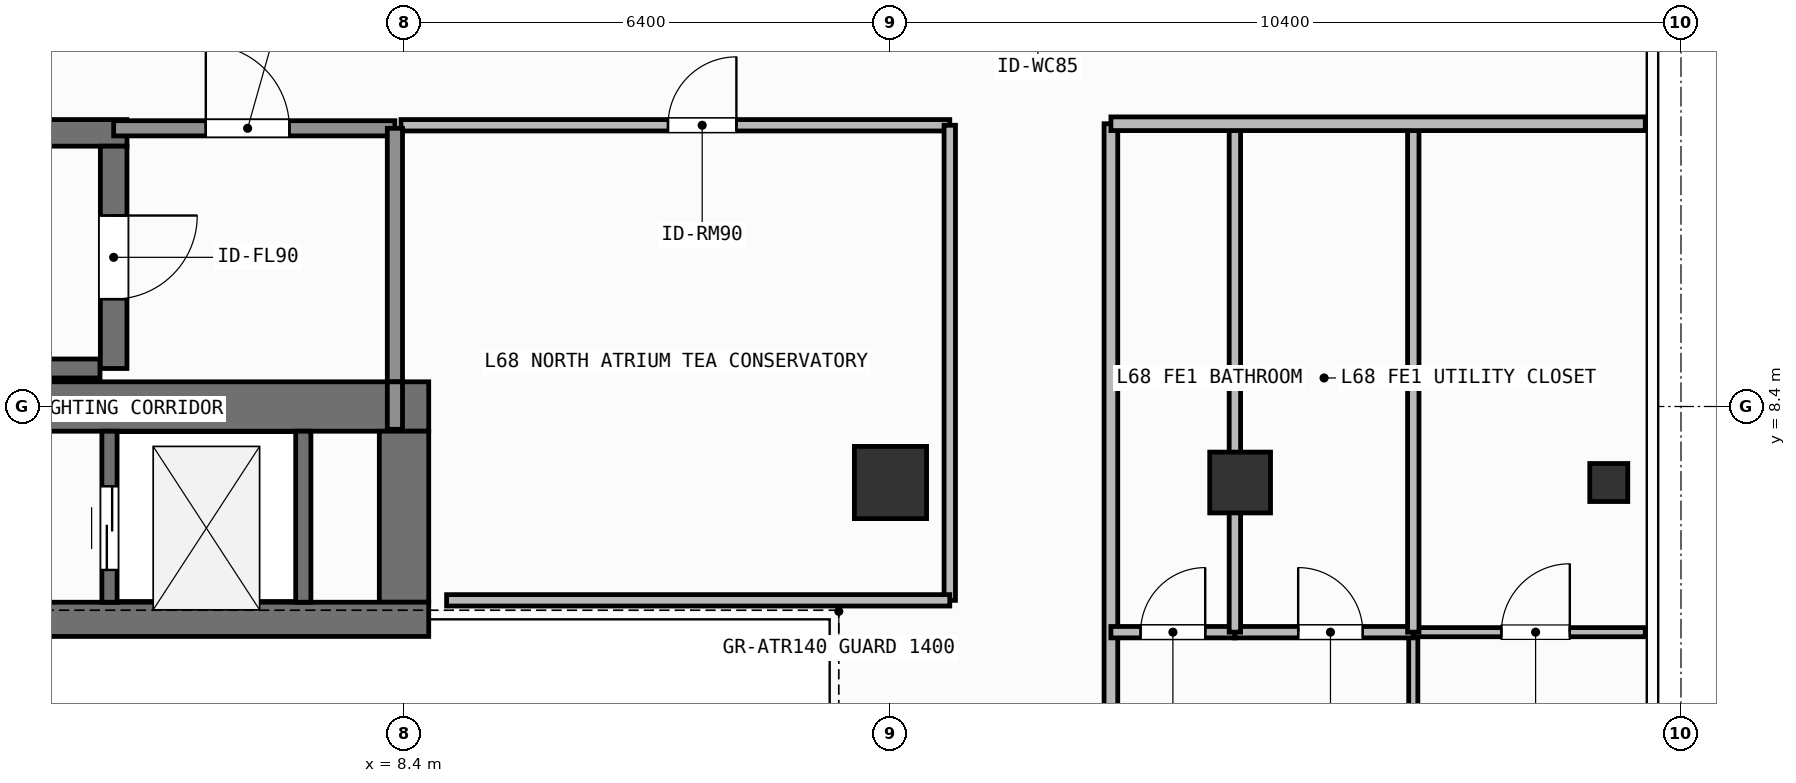
"""IFC4 building model, lengths in metres.
Left out: names, types, materials, properties, quantities, classifications, styles, units other than length and angle.
Written with IfcOpenShell. Run it as: python <this file> out.ifc"""

import sys

from ifc_helpers import new_model, si_unit, direction, frame, frame_2d, origin, origin_2d, place, context, subcontext, project, spatial, rectangle, hollow_rectangle, extrude, element, fill, save


model = new_model("IFC4")
c1 = context("Model", 3, precision=1e-05, world=origin(), true_north=direction((0.0, 1.0)))
c2 = subcontext(c1, "Body", "Model", "MODEL_VIEW")
j1 = project(units=[si_unit("LENGTHUNIT", "METRE"), si_unit("PLANEANGLEUNIT", "RADIAN")], contexts=[c1])
p1 = place(None, origin())
s1 = spatial("IfcSite", under=j1, at=p1, CompositionType="ELEMENT")
p2 = place(p1, origin())
s2 = spatial("IfcBuilding", under=s1, at=p2, CompositionType="ELEMENT")
p3 = place(p2, frame((0.0, 0.0, 278.1)))
s3 = spatial("IfcBuildingStorey", under=s2, at=p3, CompositionType="ELEMENT", Elevation=278.1)
p4 = place(p3, frame((-7.55, 8.4, 0.0), z_axis=(0.0, 0.0, 1.0), x_axis=(1.0, 0.0, 0.0)))
e1 = element("IfcWall", 1, at=p4, inside=s3, PredefinedType="SHEAR", context=c2, shape_type="SweptSolid", body=[
    extrude(rectangle(XDim=16.275, YDim=0.65, at=frame_2d((8.138, 0.0))), origin(), (0.0, 0.0, 1.0), 3.9),
])
p5 = place(p3, frame((8.4, 5.825, 0.0), z_axis=(0.0, 0.0, 1.0), x_axis=(0.0, 1.0, 0.0)))
e2 = element("IfcWall", 2, at=p5, inside=s3, PredefinedType="SHEAR", context=c2, shape_type="SweptSolid", body=[
    extrude(rectangle(XDim=2.25, YDim=0.65, at=frame_2d((1.125, 0.0))), origin(), (0.0, 0.0, 1.0), 3.9),
])
p6 = place(p3, frame((3.045, 5.6, 0.0), z_axis=(0.0, 0.0, 1.0), x_axis=(1.0, 0.0, 0.0)))
e3 = element("IfcWall", 3, at=p6, inside=s3, PredefinedType="SHEAR", context=c2, shape_type="SweptSolid", body=[
    extrude(rectangle(XDim=5.68, YDim=0.45, at=frame_2d((2.84, 0.0))), origin(), (0.0, 0.0, 1.0), 3.9),
])
p7 = place(p3, frame((-2.555, 12.0, 0.0), z_axis=(0.0, 0.0, 1.0), x_axis=(1.0, 0.0, 0.0)))
e4 = element("IfcWall", 4, at=p7, inside=s3, PredefinedType="SHEAR", context=c2, shape_type="SweptSolid", body=[
    extrude(rectangle(XDim=7.31, YDim=0.35, at=frame_2d((3.655, 0.0))), origin(), (0.0, 0.0, 1.0), 3.9),
])
p8 = place(p3, frame((-2.2, 8.9, 0.0), z_axis=(0.0, 0.0, 1.0), x_axis=(1.0, 0.0, 0.0)))
e5 = element("IfcWall", 5, at=p8, inside=s3, PredefinedType="SHEAR", context=c2, shape_type="SweptSolid", body=[
    extrude(rectangle(XDim=6.6, YDim=0.25, at=frame_2d((3.3, 0.0))), origin(), (0.0, 0.0, 1.0), 3.9),
])
p9 = place(p3, frame((4.58, 11.825, 0.0), z_axis=(0.0, 0.0, 1.0), x_axis=(0.0, -1.0, 0.0)))
e6 = element("IfcWall", 6, at=p9, inside=s3, PredefinedType="SHEAR", context=c2, shape_type="SweptSolid", body=[
    extrude(rectangle(XDim=2.925, YDim=0.35, at=frame_2d((1.462, 0.0))), origin(), (0.0, 0.0, 1.0), 3.9),
])
p10 = place(p9, frame((0.913, 0.0, 0.0)))
e7 = element("IfcOpeningElement", 7, at=p10, cuts=e6, PredefinedType="OPENING", context=c2, shape_type="SweptSolid", body=[
    extrude(rectangle(XDim=1.1, YDim=2.15, at=frame_2d((0.55, 1.075))), frame((0.0, 0.185, 0.0), z_axis=(0.0, -1.0, 0.0), x_axis=(1.0, 0.0, 0.0)), (0.0, 0.0, 1.0), 0.37),
])
p11 = place(p3, frame((14.8, 7.4, 0.0), z_axis=(0.0, 0.0, 1.0), x_axis=(1.0, 0.0, 0.0)))
e8 = element("IfcColumn", 8, at=p11, inside=s3, PredefinedType="COLUMN", context=c2, shape_type="SweptSolid", body=[
    extrude(rectangle(XDim=0.95, YDim=0.95, at=origin_2d()), origin(), (0.0, 0.0, 1.0), 3.9),
])
p12 = place(p3, frame((19.4, 7.4, 0.0), z_axis=(0.0, 0.0, 1.0), x_axis=(1.0, 0.0, 0.0)))
e9 = element("IfcColumn", 9, at=p12, inside=s3, PredefinedType="COLUMN", context=c2, shape_type="SweptSolid", body=[
    extrude(hollow_rectangle(XDim=0.8, YDim=0.8, WallThickness=0.036, at=origin_2d()), origin(), (0.0, 0.0, 1.0), 3.9),
])
p13 = place(p3, frame((24.25, 7.4, 0.0), z_axis=(0.0, 0.0, 1.0), x_axis=(1.0, 0.0, 0.0)))
e10 = element("IfcColumn", 10, at=p13, inside=s3, PredefinedType="COLUMN", context=c2, shape_type="SweptSolid", body=[
    extrude(hollow_rectangle(XDim=0.5, YDim=0.5, WallThickness=0.025, at=origin_2d()), origin(), (0.0, 0.0, 1.0), 3.9),
])
p14 = place(p3, frame((4.525, 5.825, 0.0), z_axis=(0.0, 0.0, 1.0), x_axis=(0.0, 1.0, 0.0)))
e11 = element("IfcWall", 11, at=p14, inside=s3, PredefinedType="SHEAR", context=c2, shape_type="SweptSolid", body=[
    extrude(rectangle(XDim=2.25, YDim=0.2, at=frame_2d((1.125, 0.0))), origin(), (0.0, 0.0, 1.0), 3.68),
])
p15 = place(p14, frame((0.425, 0.0, 0.0)))
e12 = element("IfcOpeningElement", 12, at=p15, cuts=e11, PredefinedType="OPENING", context=c2, shape_type="SweptSolid", body=[
    extrude(rectangle(XDim=1.1, YDim=2.2, at=frame_2d((0.55, 1.1))), frame((0.0, 0.11, 0.0), z_axis=(0.0, -1.0, 0.0), x_axis=(1.0, 0.0, 0.0)), (0.0, 0.0, 1.0), 0.22),
])
p16 = place(p3, frame((7.075, 5.825, 0.0), z_axis=(0.0, 0.0, 1.0), x_axis=(0.0, 1.0, 0.0)))
e13 = element("IfcWall", 13, at=p16, inside=s3, PredefinedType="SHEAR", context=c2, shape_type="SweptSolid", body=[
    extrude(rectangle(XDim=2.25, YDim=0.2, at=frame_2d((1.125, 0.0))), origin(), (0.0, 0.0, 1.0), 3.68),
])
p17 = place(p3, frame((4.58, 12.06, 0.0), z_axis=(0.0, 0.0, 1.0), x_axis=(1.0, 0.0, 0.0)))
e14 = element("IfcWall", 14, at=p17, inside=s3, PredefinedType="SOLIDWALL", context=c2, shape_type="SweptSolid", body=[
    extrude(rectangle(XDim=3.7, YDim=0.2, at=frame_2d((1.85, 0.0))), origin(), (0.0, 0.0, 1.0), 3.68),
])
p18 = place(p17, frame((1.212, 0.0, 0.0)))
e15 = element("IfcOpeningElement", 15, at=p18, cuts=e14, PredefinedType="OPENING", context=c2, shape_type="SweptSolid", body=[
    extrude(rectangle(XDim=1.1, YDim=2.15, at=frame_2d((0.55, 1.075))), frame((0.0, 0.11, 0.0), z_axis=(0.0, -1.0, 0.0), x_axis=(1.0, 0.0, 0.0)), (0.0, 0.0, 1.0), 0.22),
])
p19 = place(p3, frame((8.36, 12.1, 0.0), z_axis=(0.0, 0.0, 1.0), x_axis=(1.0, 0.0, 0.0)))
e16 = element("IfcWall", 16, at=p19, inside=s3, PredefinedType="PARTITIONING", context=c2, shape_type="SweptSolid", body=[
    extrude(rectangle(XDim=7.22, YDim=0.15, at=frame_2d((3.61, 0.0))), origin(), (0.0, 0.0, 1.0), 3.68),
])
p20 = place(p19, frame((3.513, 0.0, 0.0)))
e17 = element("IfcOpeningElement", 17, at=p20, cuts=e16, PredefinedType="OPENING", context=c2, shape_type="SweptSolid", body=[
    extrude(rectangle(XDim=0.9, YDim=2.1, at=frame_2d((0.45, 1.05))), frame((0.0, 0.085, 0.0), z_axis=(0.0, -1.0, 0.0), x_axis=(1.0, 0.0, 0.0)), (0.0, 0.0, 1.0), 0.17),
])
p21 = place(p3, frame((17.7, -12.12, 0.0), z_axis=(0.0, 0.0, 1.0), x_axis=(0.0, 1.0, 0.0)))
e18 = element("IfcWall", 18, at=p21, inside=s3, PredefinedType="PARTITIONING", context=c2, shape_type="SweptSolid", body=[
    extrude(rectangle(XDim=24.24, YDim=0.18, at=frame_2d((12.12, 0.0))), origin(), (0.0, 0.0, 1.0), 3.68),
])
p22 = place(p21, frame((11.62, 0.0, 0.0)))
e19 = element("IfcOpeningElement", 19, at=p22, cuts=e18, PredefinedType="OPENING", context=c2, shape_type="SweptSolid", body=[
    extrude(rectangle(XDim=1.0, YDim=2.2, at=frame_2d((0.5, 1.1))), frame((0.0, 0.1, 0.0), z_axis=(0.0, -1.0, 0.0), x_axis=(1.0, 0.0, 0.0)), (0.0, 0.0, 1.0), 0.2),
])
p23 = place(p3, frame((21.678, -5.431, 0.0), z_axis=(0.0, 0.0, 1.0), x_axis=(0.0, 1.0, 0.0)))
e20 = element("IfcWall", 20, at=p23, inside=s3, PredefinedType="PARTITIONING", context=c2, shape_type="SweptSolid", body=[
    extrude(rectangle(XDim=10.862, YDim=0.12, at=frame_2d((5.431, 0.0))), origin(), (0.0, 0.0, 1.0), 3.68),
])
p24 = place(p23, frame((4.981, 0.0, 0.0)))
e21 = element("IfcOpeningElement", 21, at=p24, cuts=e20, PredefinedType="OPENING", context=c2, shape_type="SweptSolid", body=[
    extrude(rectangle(XDim=0.9, YDim=2.1, at=frame_2d((0.45, 1.05))), frame((0.0, 0.07, 0.0), z_axis=(0.0, -1.0, 0.0), x_axis=(1.0, 0.0, 0.0)), (0.0, 0.0, 1.0), 0.14),
])
p25 = place(p3, frame((17.7, 5.431, 0.0), z_axis=(0.0, 0.0, 1.0), x_axis=(1.0, 0.0, 0.0)))
e22 = element("IfcWall", 22, at=p25, inside=s3, PredefinedType="PARTITIONING", context=c2, shape_type="SweptSolid", body=[
    extrude(rectangle(XDim=1.631, YDim=0.15, at=frame_2d((0.815, 0.0))), origin(), (0.0, 0.0, 1.0), 3.68),
])
p26 = place(p25, frame((0.39, 0.0, 0.0)))
e23 = element("IfcOpeningElement", 23, at=p26, cuts=e22, PredefinedType="OPENING", context=c2, shape_type="SweptSolid", body=[
    extrude(rectangle(XDim=0.85, YDim=2.1, at=frame_2d((0.425, 1.05))), frame((0.0, 0.085, 0.0), z_axis=(0.0, -1.0, 0.0), x_axis=(1.0, 0.0, 0.0)), (0.0, 0.0, 1.0), 0.17),
])
p27 = place(p3, frame((19.331, 5.431, 0.0), z_axis=(0.0, 0.0, 1.0), x_axis=(1.0, 0.0, 0.0)))
e24 = element("IfcWall", 24, at=p27, inside=s3, PredefinedType="PARTITIONING", context=c2, shape_type="SweptSolid", body=[
    extrude(rectangle(XDim=2.347, YDim=0.15, at=frame_2d((1.173, 0.0))), origin(), (0.0, 0.0, 1.0), 3.68),
])
p28 = place(p27, frame((0.833, 0.0, 0.0)))
e25 = element("IfcOpeningElement", 25, at=p28, cuts=e24, PredefinedType="OPENING", context=c2, shape_type="SweptSolid", body=[
    extrude(rectangle(XDim=0.85, YDim=2.1, at=frame_2d((0.425, 1.05))), frame((0.0, 0.085, 0.0), z_axis=(0.0, -1.0, 0.0), x_axis=(1.0, 0.0, 0.0)), (0.0, 0.0, 1.0), 0.17),
])
p29 = place(p3, frame((21.678, 5.431, 0.0), z_axis=(0.0, 0.0, 1.0), x_axis=(1.0, 0.0, 0.0)))
e26 = element("IfcWall", 26, at=p29, inside=s3, PredefinedType="PARTITIONING", context=c2, shape_type="SweptSolid", body=[
    extrude(rectangle(XDim=3.052, YDim=0.12, at=frame_2d((1.526, 0.0))), origin(), (0.0, 0.0, 1.0), 3.68),
])
p30 = place(p29, frame((1.159, 0.0, 0.0)))
e27 = element("IfcOpeningElement", 27, at=p30, cuts=e26, PredefinedType="OPENING", context=c2, shape_type="SweptSolid", body=[
    extrude(rectangle(XDim=0.9, YDim=2.1, at=frame_2d((0.45, 1.05))), frame((0.0, 0.07, 0.0), z_axis=(0.0, -1.0, 0.0), x_axis=(1.0, 0.0, 0.0)), (0.0, 0.0, 1.0), 0.14),
])
p31 = place(p3, frame((8.28, 8.725, 0.0), z_axis=(0.0, 0.0, 1.0), x_axis=(0.0, 1.0, 0.0)))
e28 = element("IfcWall", 28, at=p31, inside=s3, PredefinedType="SOLIDWALL", context=c2, shape_type="SweptSolid", body=[
    extrude(rectangle(XDim=3.335, YDim=0.2, at=frame_2d((1.667, 0.0))), origin(), (0.0, 0.0, 1.0), 3.68),
])
p32 = place(p3, frame((8.28, 8.1, 0.0), z_axis=(0.0, 0.0, 1.0), x_axis=(0.0, 1.0, 0.0)))
e29 = element("IfcWall", 29, at=p32, inside=s3, PredefinedType="SOLIDWALL", context=c2, shape_type="SweptSolid", body=[
    extrude(rectangle(XDim=0.625, YDim=0.2, at=frame_2d((0.312, 0.0))), origin(), (0.0, 0.0, 1.0), 3.68),
])
p33 = place(p3, frame((15.58, 5.85, 0.0), z_axis=(0.0, 0.0, 1.0), x_axis=(0.0, 1.0, 0.0)))
e30 = element("IfcWall", 30, at=p33, inside=s3, PredefinedType="PARTITIONING", context=c2, shape_type="SweptSolid", body=[
    extrude(rectangle(XDim=6.25, YDim=0.15, at=frame_2d((3.125, 0.0))), origin(), (0.0, 0.0, 1.0), 3.68),
])
p34 = place(p3, frame((8.96, 5.85, 0.0), z_axis=(0.0, 0.0, 1.0), x_axis=(1.0, 0.0, 0.0)))
e31 = element("IfcWall", 31, at=p34, inside=s3, PredefinedType="PARTITIONING", context=c2, shape_type="SweptSolid", body=[
    extrude(rectangle(XDim=6.62, YDim=0.15, at=frame_2d((3.31, 0.0))), origin(), (0.0, 0.0, 1.0), 3.68),
])
p35 = place(p3, frame((19.331, 5.431, 0.0), z_axis=(0.0, 0.0, 1.0), x_axis=(0.0, 1.0, 0.0)))
e32 = element("IfcWall", 32, at=p35, inside=s3, PredefinedType="PARTITIONING", context=c2, shape_type="SweptSolid", body=[
    extrude(rectangle(XDim=6.689, YDim=0.15, at=frame_2d((3.345, 0.0))), origin(), (0.0, 0.0, 1.0), 3.182),
])
p36 = place(p3, frame((21.678, 5.431, 0.0), z_axis=(0.0, 0.0, 1.0), x_axis=(0.0, 1.0, 0.0)))
e33 = element("IfcWall", 33, at=p36, inside=s3, PredefinedType="PARTITIONING", context=c2, shape_type="SweptSolid", body=[
    extrude(rectangle(XDim=6.689, YDim=0.15, at=frame_2d((3.345, 0.0))), origin(), (0.0, 0.0, 1.0), 3.68),
])
p37 = place(p3, frame((17.7, 12.12, 0.0), z_axis=(0.0, 0.0, 1.0), x_axis=(1.0, 0.0, 0.0)))
e34 = element("IfcWall", 34, at=p37, inside=s3, PredefinedType="PARTITIONING", context=c2, shape_type="SweptSolid", body=[
    extrude(rectangle(XDim=7.03, YDim=0.18, at=frame_2d((3.515, 0.0))), origin(), (0.0, 0.0, 1.0), 3.68),
])
p38 = place(p15, origin())
e35 = element("IfcDoor", 35, at=p38, inside=s3, OperationType="SLIDING_TO_LEFT", PredefinedType="DOOR", context=c2, shape_type="SweptSolid", body=[
    extrude(rectangle(XDim=1.1, YDim=2.2, at=frame_2d((0.55, 1.1))), frame((0.0, 0.025, 0.0), z_axis=(0.0, -1.0, 0.0), x_axis=(1.0, 0.0, 0.0)), (0.0, 0.0, 1.0), 0.05),
])
fill(e12, e35)
p39 = place(p10, origin())
e36 = element("IfcDoor", 36, at=p39, inside=s3, OperationType="SINGLE_SWING_LEFT", PredefinedType="DOOR", context=c2, shape_type="SweptSolid", body=[
    extrude(rectangle(XDim=1.1, YDim=2.15, at=frame_2d((0.55, 1.075))), frame((0.0, 0.025, 0.0), z_axis=(0.0, -1.0, 0.0), x_axis=(1.0, 0.0, 0.0)), (0.0, 0.0, 1.0), 0.05),
])
fill(e7, e36)
p40 = place(p18, origin())
e37 = element("IfcDoor", 37, at=p40, inside=s3, OperationType="SINGLE_SWING_LEFT", PredefinedType="DOOR", context=c2, shape_type="SweptSolid", body=[
    extrude(rectangle(XDim=1.1, YDim=2.15, at=frame_2d((0.55, 1.075))), frame((0.0, 0.025, 0.0), z_axis=(0.0, -1.0, 0.0), x_axis=(1.0, 0.0, 0.0)), (0.0, 0.0, 1.0), 0.05),
])
fill(e15, e37)
p41 = place(p20, origin())
e38 = element("IfcDoor", 38, at=p41, inside=s3, OperationType="SINGLE_SWING_RIGHT", PredefinedType="DOOR", context=c2, shape_type="SweptSolid", body=[
    extrude(rectangle(XDim=0.9, YDim=2.1, at=frame_2d((0.45, 1.05))), frame((0.0, 0.025, 0.0), z_axis=(0.0, -1.0, 0.0), x_axis=(1.0, 0.0, 0.0)), (0.0, 0.0, 1.0), 0.05),
])
fill(e17, e38)
p42 = place(p26, origin())
e39 = element("IfcDoor", 39, at=p42, inside=s3, OperationType="SINGLE_SWING_RIGHT", PredefinedType="DOOR", context=c2, shape_type="SweptSolid", body=[
    extrude(rectangle(XDim=0.85, YDim=2.1, at=frame_2d((0.425, 1.05))), frame((0.0, 0.025, 0.0), z_axis=(0.0, -1.0, 0.0), x_axis=(1.0, 0.0, 0.0)), (0.0, 0.0, 1.0), 0.05),
])
fill(e23, e39)
p43 = place(p28, origin())
e40 = element("IfcDoor", 40, at=p43, inside=s3, OperationType="SINGLE_SWING_LEFT", PredefinedType="DOOR", context=c2, shape_type="SweptSolid", body=[
    extrude(rectangle(XDim=0.85, YDim=2.1, at=frame_2d((0.425, 1.05))), frame((0.0, 0.025, 0.0), z_axis=(0.0, -1.0, 0.0), x_axis=(1.0, 0.0, 0.0)), (0.0, 0.0, 1.0), 0.05),
])
fill(e25, e40)
p44 = place(p30, origin())
e41 = element("IfcDoor", 41, at=p44, inside=s3, OperationType="SINGLE_SWING_RIGHT", PredefinedType="DOOR", context=c2, shape_type="SweptSolid", body=[
    extrude(rectangle(XDim=0.9, YDim=2.1, at=frame_2d((0.45, 1.05))), frame((0.0, 0.025, 0.0), z_axis=(0.0, -1.0, 0.0), x_axis=(1.0, 0.0, 0.0)), (0.0, 0.0, 1.0), 0.05),
])
fill(e27, e41)
save(model, sys.argv[1])
